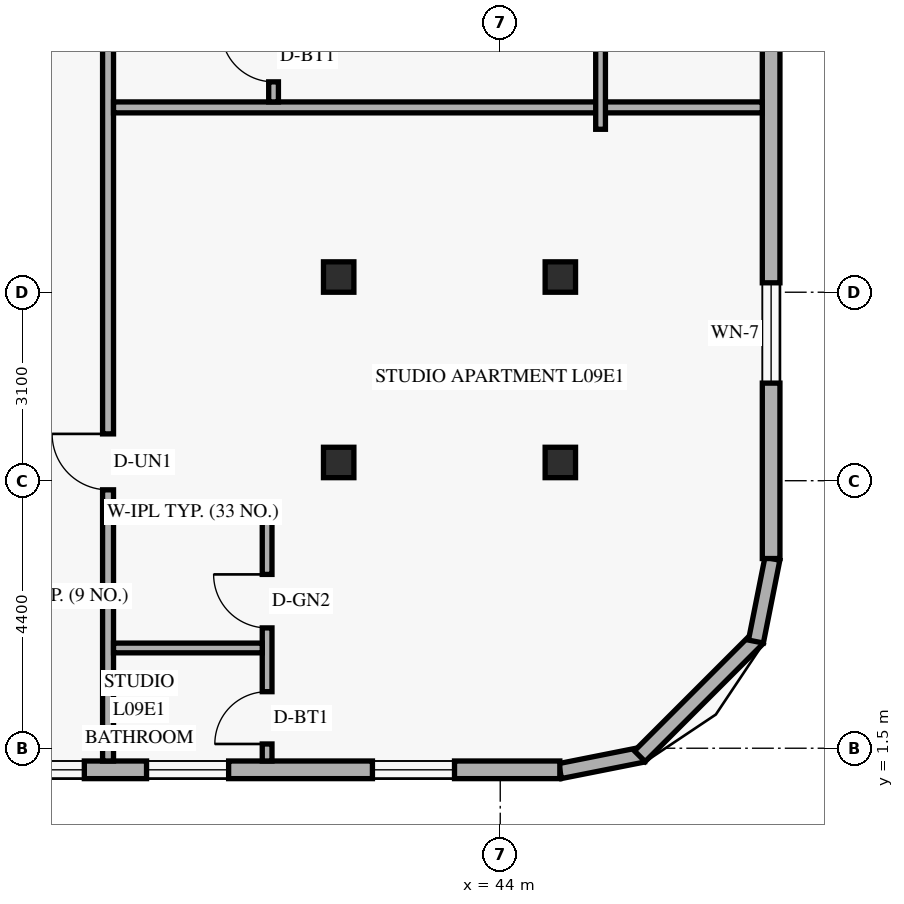
"""IFC4 building model, lengths in metres.
Left out: names, types, materials, properties, quantities, classifications, styles, units other than length and angle.
Written with IfcOpenShell. Run it as: python <this file> out.ifc"""

import sys

from ifc_helpers import new_model, si_unit, direction, frame, frame_2d, origin, origin_2d, place, context, subcontext, project, spatial, rectangle, hollow_rectangle, extrude, element, fill, save


model = new_model("IFC4")
c1 = context("Model", 3, precision=1e-05, world=origin(), true_north=direction((0.0, 1.0)))
c2 = subcontext(c1, "Body", "Model", "MODEL_VIEW")
j1 = project(units=[si_unit("LENGTHUNIT", "METRE"), si_unit("PLANEANGLEUNIT", "RADIAN")], contexts=[c1])
p1 = place(None, origin())
s1 = spatial("IfcSite", under=j1, at=p1, CompositionType="ELEMENT")
p2 = place(p1, origin())
s2 = spatial("IfcBuilding", under=s1, at=p2, CompositionType="ELEMENT")
p3 = place(p2, frame((0.0, 0.0, 38.4)))
s3 = spatial("IfcBuildingStorey", under=s2, at=p3, CompositionType="ELEMENT", Elevation=38.4)
for number, where, z_axis, x_axis in (
    (1, (41.28, 6.2, 0.0), (0.035, 0.0, 0.999), (0.0, 1.0, 0.0)),
    (2, (41.28, 9.25, 0.0), (0.035, 0.0, 0.999), (0.0, 1.0, 0.0)),
):
    element("IfcColumn", number, at=place(p3, frame(where, z_axis=z_axis, x_axis=x_axis)), inside=s3, PredefinedType="COLUMN", context=c2, shape_type="SweptSolid", body=[
        extrude(hollow_rectangle(XDim=0.5, YDim=0.5, WallThickness=0.022, at=origin_2d()), origin(), (0.0, 0.0, 1.0), 3.602),
    ])
for number, where, z_axis, x_axis in (
    (3, (44.884, 6.2, 0.0), (0.058, 0.0, 0.998), (0.0, 1.0, 0.0)),
    (4, (44.884, 9.25, 0.0), (0.058, 0.0, 0.998), (0.0, 1.0, 0.0)),
):
    element("IfcColumn", number, at=place(p3, frame(where, z_axis=z_axis, x_axis=x_axis)), inside=s3, PredefinedType="COLUMN", context=c2, shape_type="SweptSolid", body=[
        extrude(hollow_rectangle(XDim=0.5, YDim=0.5, WallThickness=0.022, at=origin_2d()), origin(), (0.0, 0.0, 1.0), 3.606),
    ])
p4 = place(p3, frame((44.983, 1.124, 0.0), z_axis=(0.0, 0.0, 1.0), x_axis=(0.980809899341, 0.19496651342, 0.0)))
e5 = element("IfcWall", 5, at=p4, inside=s3, PredefinedType="SOLIDWALL", context=c2, shape_type="SweptSolid", body=[
    extrude(rectangle(XDim=1.389, YDim=0.25, at=frame_2d((0.694, 0.0))), origin(), (0.0, 0.0, 1.0), 3.36),
])
p5 = place(p3, frame((46.295, 1.368, 0.0), z_axis=(0.0, 0.0, 1.0), x_axis=(0.707106781187, 0.707106781187, 0.0)))
e6 = element("IfcWall", 6, at=p5, inside=s3, PredefinedType="SOLIDWALL", context=c2, shape_type="SweptSolid", body=[
    extrude(rectangle(XDim=2.739, YDim=0.25, at=frame_2d((1.37, 0.0))), origin(), (0.0, 0.0, 1.0), 3.36),
])
p6 = place(p3, frame((48.205, 3.254, 0.0), z_axis=(0.0, 0.0, 1.0), x_axis=(0.19496651342, 0.980809899341, 0.0)))
e7 = element("IfcWall", 7, at=p6, inside=s3, PredefinedType="SOLIDWALL", context=c2, shape_type="SweptSolid", body=[
    extrude(rectangle(XDim=1.389, YDim=0.25, at=frame_2d((0.694, 0.0))), origin(), (0.0, 0.0, 1.0), 3.36),
])
p7 = place(p3, frame((5.42, 1.145, 0.0), z_axis=(0.0, 0.0, 1.0), x_axis=(1.0, 0.0, 0.0)))
e8 = element("IfcWall", 8, at=p7, inside=s3, PredefinedType="SOLIDWALL", context=c2, shape_type="SweptSolid", body=[
    extrude(rectangle(XDim=39.56, YDim=0.29, at=frame_2d((19.78, 0.0))), origin(), (0.0, 0.0, 1.0), 3.36),
])
p8 = place(p7, frame((2.765, 0.0, 0.85)))
e9 = element("IfcOpeningElement", 9, at=p8, cuts=e8, PredefinedType="OPENING", context=c2, shape_type="SweptSolid", body=[
    extrude(rectangle(XDim=1.35, YDim=1.55, at=frame_2d((0.675, 0.775))), frame((0.0, 0.155, 0.0), z_axis=(0.0, -1.0, 0.0), x_axis=(1.0, 0.0, 0.0)), (0.0, 0.0, 1.0), 0.31),
])
p9 = place(p7, frame((7.18, 0.0, 0.85)))
e10 = element("IfcOpeningElement", 10, at=p9, cuts=e8, PredefinedType="OPENING", context=c2, shape_type="SweptSolid", body=[
    extrude(rectangle(XDim=1.2, YDim=1.5, at=frame_2d((0.6, 0.75))), frame((0.0, 0.155, 0.0), z_axis=(0.0, -1.0, 0.0), x_axis=(1.0, 0.0, 0.0)), (0.0, 0.0, 1.0), 0.31),
])
p10 = place(p7, frame((12.056, 0.0, 0.85)))
e11 = element("IfcOpeningElement", 11, at=p10, cuts=e8, PredefinedType="OPENING", context=c2, shape_type="SweptSolid", body=[
    extrude(rectangle(XDim=1.35, YDim=1.55, at=frame_2d((0.675, 0.775))), frame((0.0, 0.155, 0.0), z_axis=(0.0, -1.0, 0.0), x_axis=(1.0, 0.0, 0.0)), (0.0, 0.0, 1.0), 0.31),
])
p11 = place(p7, frame((18.665, 0.0, 0.85)))
e12 = element("IfcOpeningElement", 12, at=p11, cuts=e8, PredefinedType="OPENING", context=c2, shape_type="SweptSolid", body=[
    extrude(rectangle(XDim=1.35, YDim=1.55, at=frame_2d((0.675, 0.775))), frame((0.0, 0.155, 0.0), z_axis=(0.0, -1.0, 0.0), x_axis=(1.0, 0.0, 0.0)), (0.0, 0.0, 1.0), 0.31),
])
p12 = place(p7, frame((25.274, 0.0, 0.85)))
e13 = element("IfcOpeningElement", 13, at=p12, cuts=e8, PredefinedType="OPENING", context=c2, shape_type="SweptSolid", body=[
    extrude(rectangle(XDim=1.35, YDim=1.55, at=frame_2d((0.675, 0.775))), frame((0.0, 0.155, 0.0), z_axis=(0.0, -1.0, 0.0), x_axis=(1.0, 0.0, 0.0)), (0.0, 0.0, 1.0), 0.31),
])
p13 = place(p7, frame((30.39, 0.0, 0.85)))
e14 = element("IfcOpeningElement", 14, at=p13, cuts=e8, PredefinedType="OPENING", context=c2, shape_type="SweptSolid", body=[
    extrude(rectangle(XDim=1.35, YDim=1.55, at=frame_2d((0.675, 0.775))), frame((0.0, 0.155, 0.0), z_axis=(0.0, -1.0, 0.0), x_axis=(1.0, 0.0, 0.0)), (0.0, 0.0, 1.0), 0.31),
])
p14 = place(p7, frame((32.763, 0.0, 0.85)))
e15 = element("IfcOpeningElement", 15, at=p14, cuts=e8, PredefinedType="OPENING", context=c2, shape_type="SweptSolid", body=[
    extrude(rectangle(XDim=1.35, YDim=1.55, at=frame_2d((0.675, 0.775))), frame((0.0, 0.155, 0.0), z_axis=(0.0, -1.0, 0.0), x_axis=(1.0, 0.0, 0.0)), (0.0, 0.0, 1.0), 0.31),
])
p15 = place(p7, frame((36.478, 0.0, 0.85)))
e16 = element("IfcOpeningElement", 16, at=p15, cuts=e8, PredefinedType="OPENING", context=c2, shape_type="SweptSolid", body=[
    extrude(rectangle(XDim=1.35, YDim=1.55, at=frame_2d((0.675, 0.775))), frame((0.0, 0.155, 0.0), z_axis=(0.0, -1.0, 0.0), x_axis=(1.0, 0.0, 0.0)), (0.0, 0.0, 1.0), 0.31),
])
p16 = place(p3, frame((48.455, 4.62, 0.0), z_axis=(0.0, 0.0, 1.0), x_axis=(0.0, 1.0, 0.0)))
e17 = element("IfcWall", 17, at=p16, inside=s3, PredefinedType="SOLIDWALL", context=c2, shape_type="SweptSolid", body=[
    extrude(rectangle(XDim=38.76, YDim=0.29, at=frame_2d((19.38, 0.0))), origin(), (0.0, 0.0, 1.0), 3.36),
])
p17 = place(p16, frame((2.885, 0.0, 0.85)))
e18 = element("IfcOpeningElement", 18, at=p17, cuts=e17, PredefinedType="OPENING", context=c2, shape_type="SweptSolid", body=[
    extrude(rectangle(XDim=1.65, YDim=1.6, at=frame_2d((0.825, 0.8))), frame((0.0, 0.155, 0.0), z_axis=(0.0, -1.0, 0.0), x_axis=(1.0, 0.0, 0.0)), (0.0, 0.0, 1.0), 0.31),
])
p18 = place(p16, frame((11.215, 0.0, 0.85)))
e19 = element("IfcOpeningElement", 19, at=p18, cuts=e17, PredefinedType="OPENING", context=c2, shape_type="SweptSolid", body=[
    extrude(rectangle(XDim=1.65, YDim=1.6, at=frame_2d((0.825, 0.8))), frame((0.0, 0.155, 0.0), z_axis=(0.0, -1.0, 0.0), x_axis=(1.0, 0.0, 0.0)), (0.0, 0.0, 1.0), 0.31),
])
p19 = place(p16, frame((17.655, 0.0, 0.85)))
e20 = element("IfcOpeningElement", 20, at=p19, cuts=e17, PredefinedType="OPENING", context=c2, shape_type="SweptSolid", body=[
    extrude(rectangle(XDim=1.65, YDim=1.6, at=frame_2d((0.825, 0.8))), frame((0.0, 0.155, 0.0), z_axis=(0.0, -1.0, 0.0), x_axis=(1.0, 0.0, 0.0)), (0.0, 0.0, 1.0), 0.31),
])
p20 = place(p16, frame((23.46, 0.0, 0.85)))
e21 = element("IfcOpeningElement", 21, at=p20, cuts=e17, PredefinedType="OPENING", context=c2, shape_type="SweptSolid", body=[
    extrude(rectangle(XDim=1.65, YDim=1.6, at=frame_2d((0.825, 0.8))), frame((0.0, 0.155, 0.0), z_axis=(0.0, -1.0, 0.0), x_axis=(1.0, 0.0, 0.0)), (0.0, 0.0, 1.0), 0.31),
])
p21 = place(p16, frame((29.44, 0.0, 0.85)))
e22 = element("IfcOpeningElement", 22, at=p21, cuts=e17, PredefinedType="OPENING", context=c2, shape_type="SweptSolid", body=[
    extrude(rectangle(XDim=1.65, YDim=1.6, at=frame_2d((0.825, 0.8))), frame((0.0, 0.155, 0.0), z_axis=(0.0, -1.0, 0.0), x_axis=(1.0, 0.0, 0.0)), (0.0, 0.0, 1.0), 0.31),
])
p22 = place(p16, frame((34.685, 0.0, 0.85)))
e23 = element("IfcOpeningElement", 23, at=p22, cuts=e17, PredefinedType="OPENING", context=c2, shape_type="SweptSolid", body=[
    extrude(rectangle(XDim=1.65, YDim=1.6, at=frame_2d((0.825, 0.8))), frame((0.0, 0.155, 0.0), z_axis=(0.0, -1.0, 0.0), x_axis=(1.0, 0.0, 0.0)), (0.0, 0.0, 1.0), 0.31),
])
p23 = place(p3, frame((37.55, 1.29, 0.0), z_axis=(0.0, 0.0, 1.0), x_axis=(0.0, 1.0, 0.0)))
e24 = element("IfcWall", 24, at=p23, inside=s3, PredefinedType="STANDARD", context=c2, shape_type="SweptSolid", body=[
    extrude(rectangle(XDim=45.42, YDim=0.18, at=frame_2d((22.71, 0.0))), origin(), (0.0, 0.0, 1.0), 2.649),
])
p24 = place(p23, frame((4.46, 0.0, 0.0)))
e25 = element("IfcOpeningElement", 25, at=p24, cuts=e24, PredefinedType="OPENING", context=c2, shape_type="SweptSolid", body=[
    extrude(rectangle(XDim=0.92, YDim=2.15, at=frame_2d((0.46, 1.075))), frame((0.0, 0.1, 0.0), z_axis=(0.0, -1.0, 0.0), x_axis=(1.0, 0.0, 0.0)), (0.0, 0.0, 1.0), 0.2),
])
p25 = place(p23, frame((15.907, 0.0, 0.0)))
e26 = element("IfcOpeningElement", 26, at=p25, cuts=e24, PredefinedType="OPENING", context=c2, shape_type="SweptSolid", body=[
    extrude(rectangle(XDim=0.92, YDim=2.15, at=frame_2d((0.46, 1.075))), frame((0.0, 0.1, 0.0), z_axis=(0.0, -1.0, 0.0), x_axis=(1.0, 0.0, 0.0)), (0.0, 0.0, 1.0), 0.2),
])
p26 = place(p23, frame((28.23, 0.0, 0.0)))
e27 = element("IfcOpeningElement", 27, at=p26, cuts=e24, PredefinedType="OPENING", context=c2, shape_type="SweptSolid", body=[
    extrude(rectangle(XDim=0.92, YDim=2.15, at=frame_2d((0.46, 1.075))), frame((0.0, 0.1, 0.0), z_axis=(0.0, -1.0, 0.0), x_axis=(1.0, 0.0, 0.0)), (0.0, 0.0, 1.0), 0.2),
])
p27 = place(p23, frame((40.02, 0.0, 0.0)))
e28 = element("IfcOpeningElement", 28, at=p27, cuts=e24, PredefinedType="OPENING", context=c2, shape_type="SweptSolid", body=[
    extrude(rectangle(XDim=0.92, YDim=2.15, at=frame_2d((0.46, 1.075))), frame((0.0, 0.1, 0.0), z_axis=(0.0, -1.0, 0.0), x_axis=(1.0, 0.0, 0.0)), (0.0, 0.0, 1.0), 0.2),
])
p28 = place(p3, frame((37.64, 5.39, 0.0), z_axis=(0.0, 0.0, 1.0), x_axis=(1.0, 0.0, 0.0)))
e29 = element("IfcWall", 29, at=p28, inside=s3, PredefinedType="PLUMBINGWALL", context=c2, shape_type="SweptSolid", body=[
    extrude(rectangle(XDim=2.606, YDim=0.16, at=frame_2d((1.303, 0.0))), origin(), (0.0, 0.0, 1.0), 3.36),
])
p29 = place(p3, frame((40.166, 1.29, 0.0), z_axis=(0.0, 0.0, 1.0), x_axis=(0.0, 1.0, 0.0)))
e30 = element("IfcWall", 30, at=p29, inside=s3, PredefinedType="PLUMBINGWALL", context=c2, shape_type="SweptSolid", body=[
    extrude(rectangle(XDim=4.19, YDim=0.16, at=frame_2d((2.095, 0.0))), origin(), (0.0, 0.0, 1.0), 3.36),
])
p30 = place(p29, frame((0.28, 0.0, 0.0)))
e31 = element("IfcOpeningElement", 31, at=p30, cuts=e30, PredefinedType="OPENING", context=c2, shape_type="SweptSolid", body=[
    extrude(rectangle(XDim=0.86, YDim=2.12, at=frame_2d((0.43, 1.06))), frame((0.0, 0.09, 0.0), z_axis=(0.0, -1.0, 0.0), x_axis=(1.0, 0.0, 0.0)), (0.0, 0.0, 1.0), 0.18),
])
p31 = place(p29, frame((2.189, 0.0, 0.0)))
e32 = element("IfcOpeningElement", 32, at=p31, cuts=e30, PredefinedType="OPENING", context=c2, shape_type="SweptSolid", body=[
    extrude(rectangle(XDim=0.88, YDim=2.12, at=frame_2d((0.44, 1.06))), frame((0.0, 0.09, 0.0), z_axis=(0.0, -1.0, 0.0), x_axis=(1.0, 0.0, 0.0)), (0.0, 0.0, 1.0), 0.18),
])
p32 = place(p3, frame((37.64, 3.149, 0.0), z_axis=(0.0, 0.0, 1.0), x_axis=(1.0, 0.0, 0.0)))
e33 = element("IfcWall", 33, at=p32, inside=s3, PredefinedType="PLUMBINGWALL", context=c2, shape_type="SweptSolid", body=[
    extrude(rectangle(XDim=2.446, YDim=0.16, at=frame_2d((1.223, 0.0))), origin(), (0.0, 0.0, 1.0), 3.36),
])
p33 = place(p3, frame((37.64, 12.04, 0.0), z_axis=(0.0, 0.0, 1.0), x_axis=(1.0, 0.0, 0.0)))
e34 = element("IfcWall", 34, at=p33, inside=s3, PredefinedType="PARTITIONING", context=c2, shape_type="SweptSolid", body=[
    extrude(rectangle(XDim=10.67, YDim=0.18, at=frame_2d((5.335, 0.0))), origin(), (0.0, 0.0, 1.0), 2.649),
])
p34 = place(p3, frame((40.272, 12.13, 0.0), z_axis=(0.0, 0.0, 1.0), x_axis=(0.0, 1.0, 0.0)))
e35 = element("IfcWall", 35, at=p34, inside=s3, PredefinedType="PLUMBINGWALL", context=c2, shape_type="SweptSolid", body=[
    extrude(rectangle(XDim=4.797, YDim=0.16, at=frame_2d((2.398, 0.0))), origin(), (0.0, 0.0, 1.0), 2.932),
])
p35 = place(p34, frame((0.33, 0.0, 0.0)))
e36 = element("IfcOpeningElement", 36, at=p35, cuts=e35, PredefinedType="OPENING", context=c2, shape_type="SweptSolid", body=[
    extrude(rectangle(XDim=0.86, YDim=2.12, at=frame_2d((0.43, 1.06))), frame((0.0, 0.09, 0.0), z_axis=(0.0, -1.0, 0.0), x_axis=(1.0, 0.0, 0.0)), (0.0, 0.0, 1.0), 0.18),
])
p36 = place(p34, frame((2.495, 0.0, 0.0)))
e37 = element("IfcOpeningElement", 37, at=p36, cuts=e35, PredefinedType="OPENING", context=c2, shape_type="SweptSolid", body=[
    extrude(rectangle(XDim=0.88, YDim=2.12, at=frame_2d((0.44, 1.06))), frame((0.0, 0.09, 0.0), z_axis=(0.0, -1.0, 0.0), x_axis=(1.0, 0.0, 0.0)), (0.0, 0.0, 1.0), 0.18),
])
p37 = place(p3, frame((45.65, 11.68, 0.0), z_axis=(0.0, 0.0, 1.0), x_axis=(0.0, 1.0, 0.0)))
e38 = element("IfcWall", 38, at=p37, inside=s3, PredefinedType="PARTITIONING", context=c2, shape_type="SweptSolid", body=[
    extrude(rectangle(XDim=9.68, YDim=0.16, at=frame_2d((4.84, 0.0))), origin(), (0.0, 0.0, 1.0), 3.36),
])
p38 = place(p37, frame((4.08, 0.0, 0.0)))
e39 = element("IfcOpeningElement", 39, at=p38, cuts=e38, PredefinedType="OPENING", context=c2, shape_type="SweptSolid", body=[
    extrude(rectangle(XDim=0.95, YDim=2.15, at=frame_2d((0.475, 1.075))), frame((0.0, 0.09, 0.0), z_axis=(0.0, -1.0, 0.0), x_axis=(1.0, 0.0, 0.0)), (0.0, 0.0, 1.0), 0.18),
])
p39 = place(p13, origin())
e40 = element("IfcWindow", 40, at=p39, inside=s3, PartitioningType="SINGLE_PANEL", PredefinedType="WINDOW", context=c2, shape_type="SweptSolid", body=[
    extrude(rectangle(XDim=1.35, YDim=1.55, at=frame_2d((0.675, 0.775))), frame((0.0, 0.03, 0.0), z_axis=(0.0, -1.0, 0.0), x_axis=(1.0, 0.0, 0.0)), (0.0, 0.0, 1.0), 0.06),
])
fill(e14, e40)
p40 = place(p14, origin())
e41 = element("IfcWindow", 41, at=p40, inside=s3, PartitioningType="SINGLE_PANEL", PredefinedType="WINDOW", context=c2, shape_type="SweptSolid", body=[
    extrude(rectangle(XDim=1.35, YDim=1.55, at=frame_2d((0.675, 0.775))), frame((0.0, 0.03, 0.0), z_axis=(0.0, -1.0, 0.0), x_axis=(1.0, 0.0, 0.0)), (0.0, 0.0, 1.0), 0.06),
])
fill(e15, e41)
p41 = place(p15, origin())
e42 = element("IfcWindow", 42, at=p41, inside=s3, PartitioningType="SINGLE_PANEL", PredefinedType="WINDOW", context=c2, shape_type="SweptSolid", body=[
    extrude(rectangle(XDim=1.35, YDim=1.55, at=frame_2d((0.675, 0.775))), frame((0.0, 0.03, 0.0), z_axis=(0.0, -1.0, 0.0), x_axis=(1.0, 0.0, 0.0)), (0.0, 0.0, 1.0), 0.06),
])
fill(e16, e42)
p42 = place(p17, origin())
e43 = element("IfcWindow", 43, at=p42, inside=s3, PartitioningType="SINGLE_PANEL", PredefinedType="WINDOW", context=c2, shape_type="SweptSolid", body=[
    extrude(rectangle(XDim=1.65, YDim=1.6, at=frame_2d((0.825, 0.8))), frame((0.0, 0.03, 0.0), z_axis=(0.0, -1.0, 0.0), x_axis=(1.0, 0.0, 0.0)), (0.0, 0.0, 1.0), 0.06),
])
fill(e18, e43)
p43 = place(p24, origin())
e44 = element("IfcDoor", 44, at=p43, inside=s3, OperationType="SINGLE_SWING_RIGHT", PredefinedType="DOOR", context=c2, shape_type="SweptSolid", body=[
    extrude(rectangle(XDim=0.92, YDim=2.15, at=frame_2d((0.46, 1.075))), frame((0.0, 0.025, 0.0), z_axis=(0.0, -1.0, 0.0), x_axis=(1.0, 0.0, 0.0)), (0.0, 0.0, 1.0), 0.05),
])
fill(e25, e44)
p44 = place(p30, origin())
e45 = element("IfcDoor", 45, at=p44, inside=s3, OperationType="SINGLE_SWING_LEFT", PredefinedType="DOOR", context=c2, shape_type="SweptSolid", body=[
    extrude(rectangle(XDim=0.86, YDim=2.12, at=frame_2d((0.43, 1.06))), frame((0.0, 0.025, 0.0), z_axis=(0.0, -1.0, 0.0), x_axis=(1.0, 0.0, 0.0)), (0.0, 0.0, 1.0), 0.05),
])
fill(e31, e45)
p45 = place(p31, origin())
e46 = element("IfcDoor", 46, at=p45, inside=s3, OperationType="SINGLE_SWING_RIGHT", PredefinedType="DOOR", context=c2, shape_type="SweptSolid", body=[
    extrude(rectangle(XDim=0.88, YDim=2.12, at=frame_2d((0.44, 1.06))), frame((0.0, 0.025, 0.0), z_axis=(0.0, -1.0, 0.0), x_axis=(1.0, 0.0, 0.0)), (0.0, 0.0, 1.0), 0.05),
])
fill(e32, e46)
p46 = place(p35, origin())
e47 = element("IfcDoor", 47, at=p46, inside=s3, OperationType="SINGLE_SWING_RIGHT", PredefinedType="DOOR", context=c2, shape_type="SweptSolid", body=[
    extrude(rectangle(XDim=0.86, YDim=2.12, at=frame_2d((0.43, 1.06))), frame((0.0, 0.025, 0.0), z_axis=(0.0, -1.0, 0.0), x_axis=(1.0, 0.0, 0.0)), (0.0, 0.0, 1.0), 0.05),
])
fill(e36, e47)
save(model, sys.argv[1])
